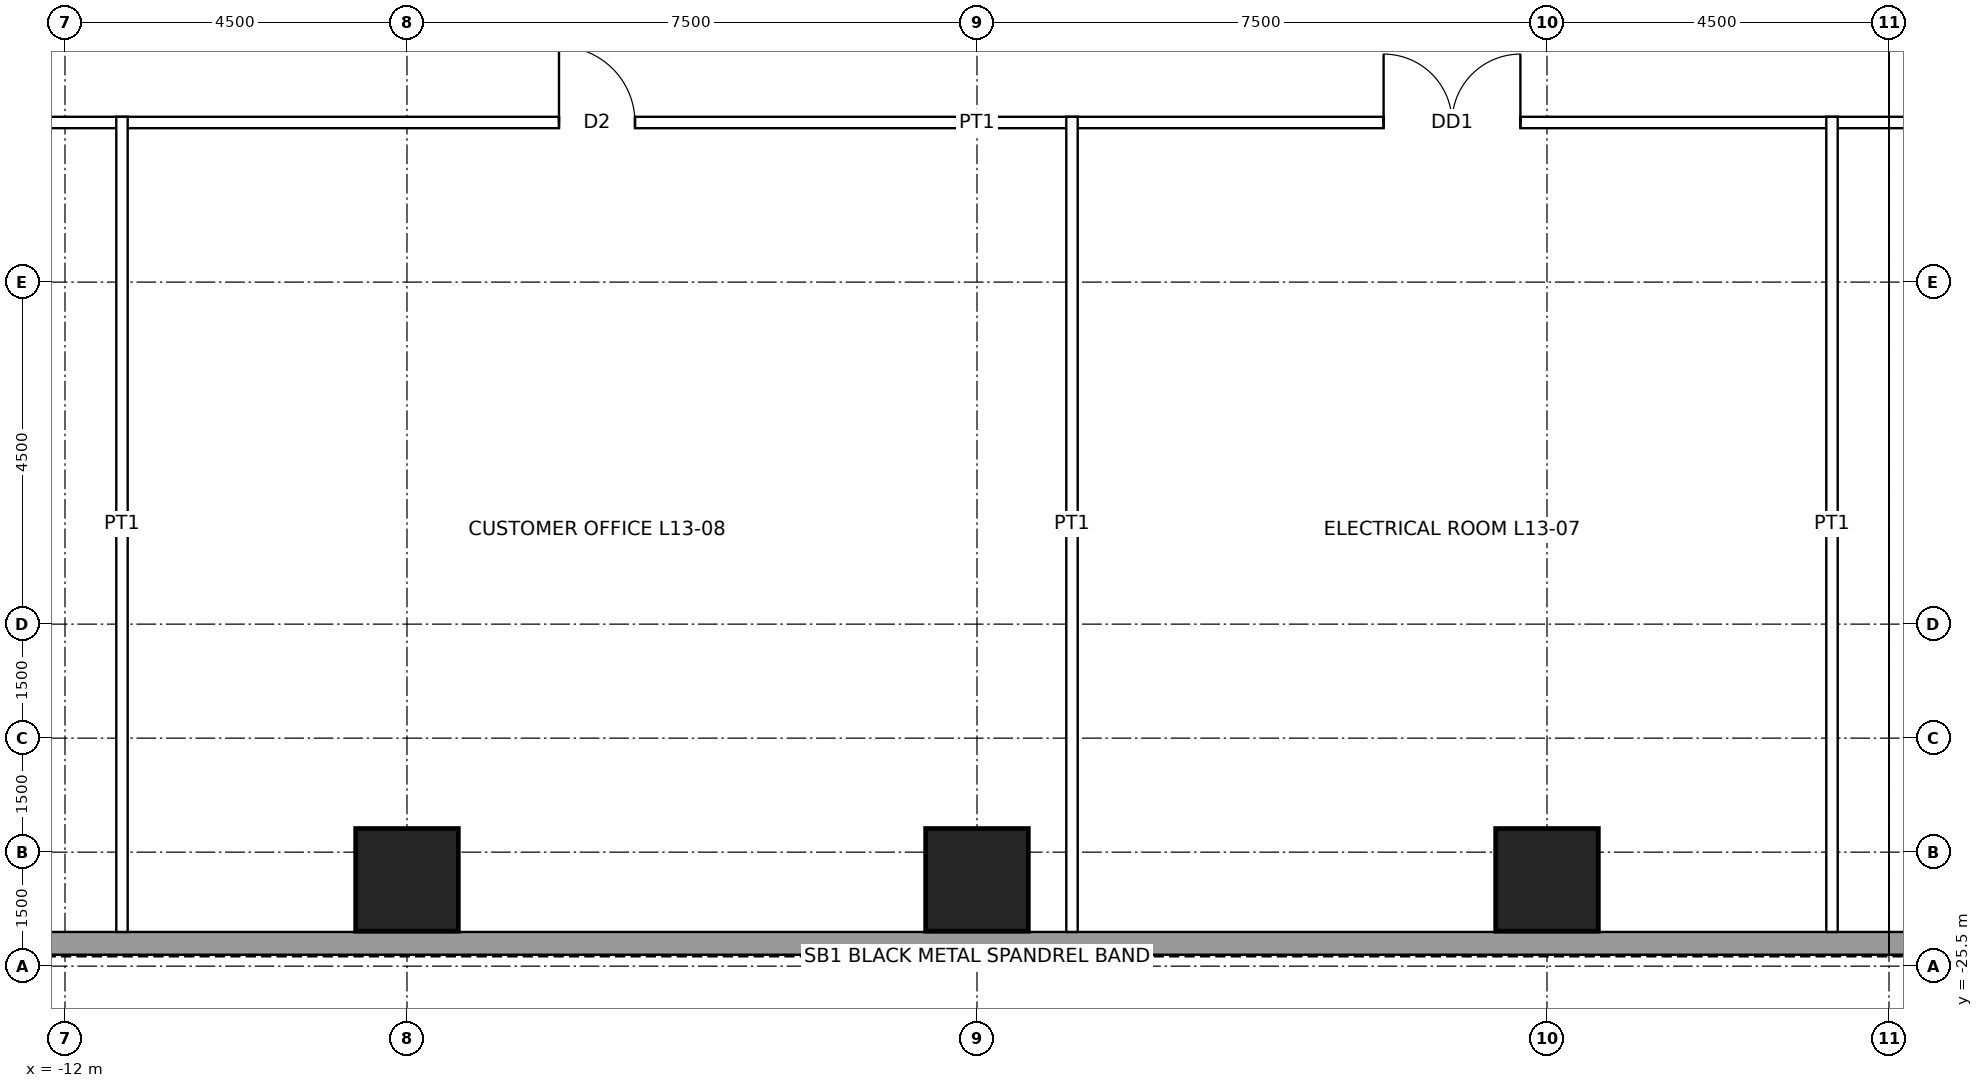
"""IFC4 building model, lengths in metres.
Left out: names, types, materials, properties, quantities, classifications, styles, units other than length and angle.
Written with IfcOpenShell. Run it as: python <this file> out.ifc"""

import sys

from ifc_helpers import new_model, si_unit, direction, frame, frame_2d, origin, origin_2d, place, context, subcontext, project, spatial, rectangle, hollow_rectangle, extrude, element, fill, save


model = new_model("IFC4")
c1 = context("Model", 3, precision=1e-05, world=origin(), true_north=direction((0.0, 1.0)))
c2 = subcontext(c1, "Body", "Model", "MODEL_VIEW")
j1 = project(units=[si_unit("LENGTHUNIT", "METRE"), si_unit("PLANEANGLEUNIT", "RADIAN")], contexts=[c1])
p1 = place(None, origin())
s1 = spatial("IfcSite", under=j1, at=p1, CompositionType="ELEMENT")
p2 = place(p1, origin())
s2 = spatial("IfcBuilding", under=s1, at=p2, CompositionType="ELEMENT")
p3 = place(p2, frame((0.0, 0.0, 68.4)))
s3 = spatial("IfcBuildingStorey", under=s2, at=p3, CompositionType="ELEMENT", Elevation=68.4)
for number, where, z_axis, x_axis in (
    (1, (7.5, -24.365, 0.0), (0.0, 0.0, 1.0), (1.0, 0.0, 0.0)),
    (2, (0.0, -24.365, 0.0), (0.0, 0.0, 1.0), (1.0, 0.0, 0.0)),
    (3, (-7.5, -24.365, 0.0), (0.0, 0.0, 1.0), (1.0, 0.0, 0.0)),
):
    element("IfcColumn", number, at=place(p3, frame(where, z_axis=z_axis, x_axis=x_axis)), inside=s3, PredefinedType="COLUMN", context=c2, shape_type="SweptSolid", body=[
        extrude(hollow_rectangle(XDim=1.35, YDim=1.35, WallThickness=0.085, at=origin_2d()), origin(), (0.0, 0.0, 1.0), 5.0),
    ])
p4 = place(p3, frame((17.7, -25.2, 0.0), z_axis=(0.0, 0.0, 1.0), x_axis=(-1.0, 0.0, 0.0)))
e4 = element("IfcWall", 4, at=p4, inside=s3, PredefinedType="SOLIDWALL", context=c2, shape_type="SweptSolid", body=[
    extrude(rectangle(XDim=35.4, YDim=0.3, at=frame_2d((17.7, 0.0))), origin(), (0.0, 0.0, 1.0), 4.8),
])
p5 = place(p3, frame((-14.475, -14.4, 0.0), z_axis=(0.0, 0.0, 1.0), x_axis=(1.0, 0.0, 0.0)))
e5 = element("IfcWall", 5, at=p5, inside=s3, PredefinedType="PARTITIONING", context=c2, shape_type="SweptSolid", body=[
    extrude(rectangle(XDim=28.95, YDim=0.15, at=frame_2d((14.475, 0.0))), origin(), (0.0, 0.0, 1.0), 4.8),
])
p6 = place(p5, frame((19.825, 0.0, 0.0)))
e6 = element("IfcOpeningElement", 6, at=p6, cuts=e5, PredefinedType="OPENING", context=c2, shape_type="SweptSolid", body=[
    extrude(rectangle(XDim=1.8, YDim=2.4, at=frame_2d((0.9, 1.2))), frame((0.0, 0.085, 0.0), z_axis=(0.0, -1.0, 0.0), x_axis=(1.0, 0.0, 0.0)), (0.0, 0.0, 1.0), 0.17),
])
p7 = place(p5, frame((8.975, 0.0, 0.0)))
e7 = element("IfcOpeningElement", 7, at=p7, cuts=e5, PredefinedType="OPENING", context=c2, shape_type="SweptSolid", body=[
    extrude(rectangle(XDim=1.0, YDim=2.1, at=frame_2d((0.5, 1.05))), frame((0.0, 0.085, 0.0), z_axis=(0.0, -1.0, 0.0), x_axis=(1.0, 0.0, 0.0)), (0.0, 0.0, 1.0), 0.17),
])
p8 = place(p5, frame((26.8, 0.0, 0.0)))
e8 = element("IfcOpeningElement", 8, at=p8, cuts=e5, PredefinedType="OPENING", context=c2, shape_type="SweptSolid", body=[
    extrude(rectangle(XDim=1.0, YDim=2.1, at=frame_2d((0.5, 1.05))), frame((0.0, 0.085, 0.0), z_axis=(0.0, -1.0, 0.0), x_axis=(1.0, 0.0, 0.0)), (0.0, 0.0, 1.0), 0.17),
])
p9 = place(p5, frame((1.15, 0.0, 0.0)))
e9 = element("IfcOpeningElement", 9, at=p9, cuts=e5, PredefinedType="OPENING", context=c2, shape_type="SweptSolid", body=[
    extrude(rectangle(XDim=1.0, YDim=2.1, at=frame_2d((0.5, 1.05))), frame((0.0, 0.085, 0.0), z_axis=(0.0, -1.0, 0.0), x_axis=(1.0, 0.0, 0.0)), (0.0, 0.0, 1.0), 0.17),
])
p10 = place(p3, frame((-11.25, -25.05, 0.0), z_axis=(0.0, 0.0, 1.0), x_axis=(0.0, 1.0, 0.0)))
e10 = element("IfcWall", 10, at=p10, inside=s3, PredefinedType="PARTITIONING", context=c2, shape_type="SweptSolid", body=[
    extrude(rectangle(XDim=10.725, YDim=0.15, at=frame_2d((5.363, 0.0))), origin(), (0.0, 0.0, 1.0), 3.853),
])
p11 = place(p3, frame((1.25, -25.05, 0.0), z_axis=(0.0, 0.0, 1.0), x_axis=(0.0, 1.0, 0.0)))
e11 = element("IfcWall", 11, at=p11, inside=s3, PredefinedType="PARTITIONING", context=c2, shape_type="SweptSolid", body=[
    extrude(rectangle(XDim=10.725, YDim=0.15, at=frame_2d((5.363, 0.0))), origin(), (0.0, 0.0, 1.0), 4.8),
])
p12 = place(p3, frame((11.25, -25.05, 0.0), z_axis=(0.0, 0.0, 1.0), x_axis=(0.0, 1.0, 0.0)))
e12 = element("IfcWall", 12, at=p12, inside=s3, PredefinedType="PARTITIONING", context=c2, shape_type="SweptSolid", body=[
    extrude(rectangle(XDim=10.725, YDim=0.15, at=frame_2d((5.363, 0.0))), origin(), (0.0, 0.0, 1.0), 3.853),
])
p13 = place(p6, origin())
e13 = element("IfcDoor", 13, at=p13, inside=s3, OperationType="DOUBLE_DOOR_SINGLE_SWING", PredefinedType="DOOR", context=c2, shape_type="SweptSolid", body=[
    extrude(rectangle(XDim=1.8, YDim=2.4, at=frame_2d((0.9, 1.2))), frame((0.0, 0.025, 0.0), z_axis=(0.0, -1.0, 0.0), x_axis=(1.0, 0.0, 0.0)), (0.0, 0.0, 1.0), 0.05),
])
fill(e6, e13)
p14 = place(p7, origin())
e14 = element("IfcDoor", 14, at=p14, inside=s3, OperationType="SINGLE_SWING_LEFT", PredefinedType="DOOR", context=c2, shape_type="SweptSolid", body=[
    extrude(rectangle(XDim=1.0, YDim=2.1, at=frame_2d((0.5, 1.05))), frame((0.0, 0.025, 0.0), z_axis=(0.0, -1.0, 0.0), x_axis=(1.0, 0.0, 0.0)), (0.0, 0.0, 1.0), 0.05),
])
fill(e7, e14)
save(model, sys.argv[1])
